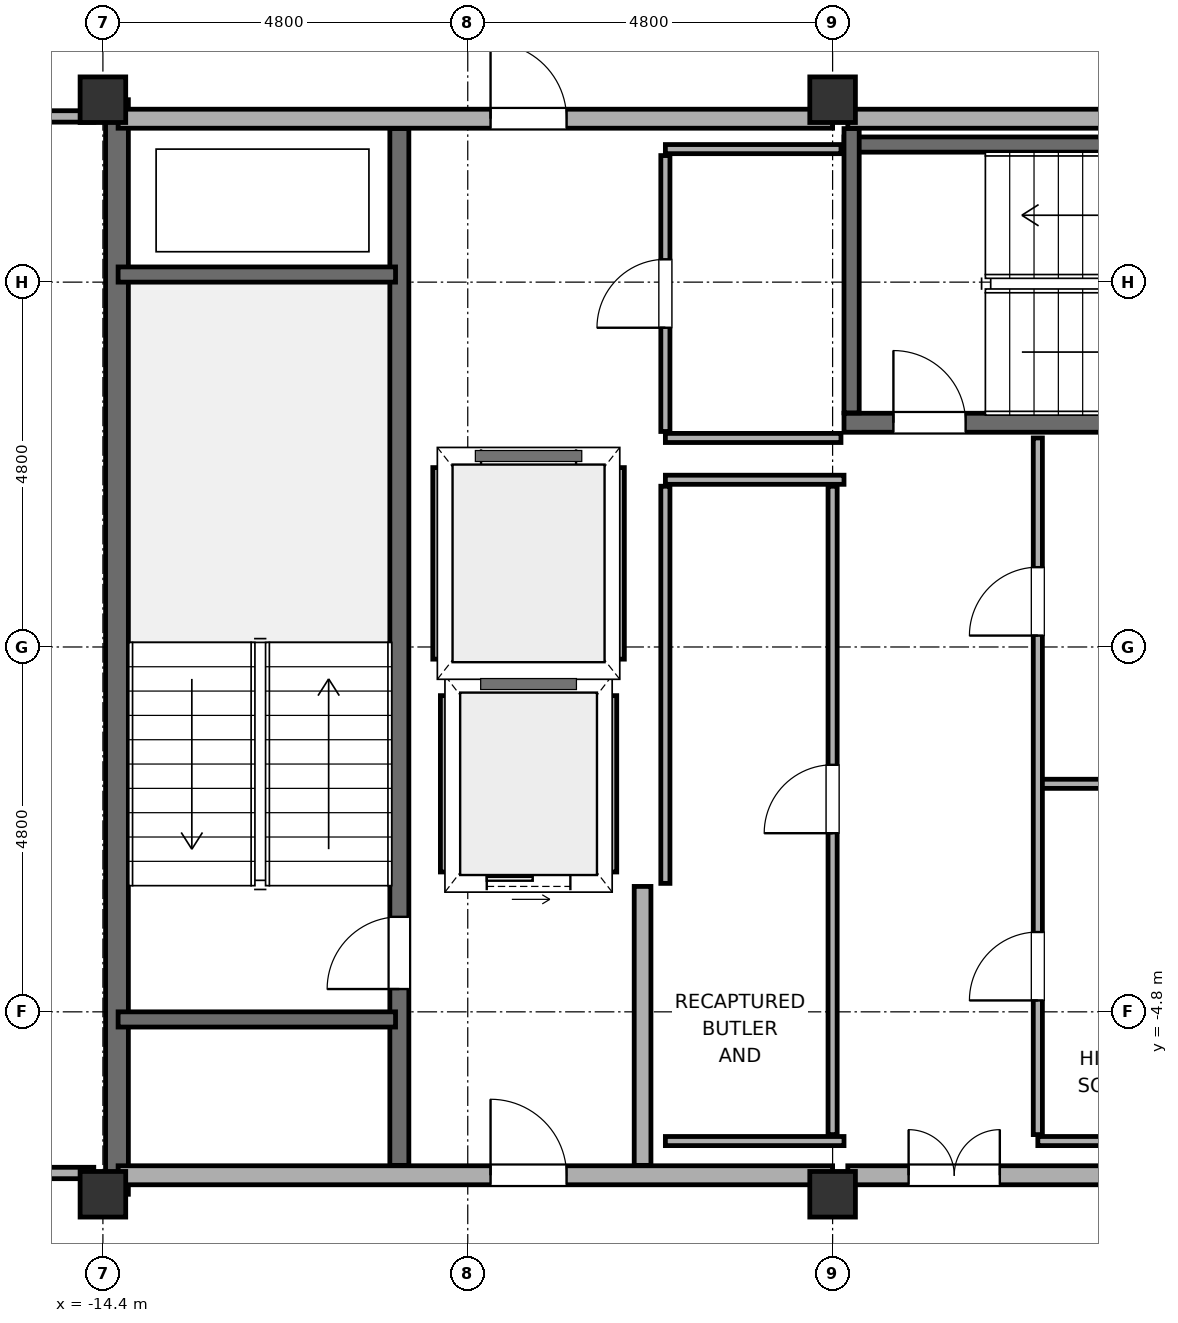
"""IFC4 building model, lengths in metres.
Left out: names, types, materials, properties, quantities, classifications, styles, units other than length and angle.
Written with IfcOpenShell. Run it as: python <this file> out.ifc"""

import sys

from ifc_helpers import new_model, si_unit, direction, frame, frame_2d, origin, origin_2d, place, context, subcontext, project, spatial, rectangle, hollow_rectangle, extrude, element, fill, save


model = new_model("IFC4")
c1 = context("Model", 3, precision=1e-05, world=origin(), true_north=direction((0.0, 1.0)))
c2 = subcontext(c1, "Body", "Model", "MODEL_VIEW")
j1 = project(units=[si_unit("LENGTHUNIT", "METRE"), si_unit("PLANEANGLEUNIT", "RADIAN")], contexts=[c1])
p1 = place(None, origin())
s1 = spatial("IfcSite", under=j1, at=p1, CompositionType="ELEMENT")
p2 = place(p1, origin())
s2 = spatial("IfcBuilding", under=s1, at=p2, CompositionType="ELEMENT")
p3 = place(p2, frame((0.0, 0.0, 222.3)))
s3 = spatial("IfcBuildingStorey", under=s2, at=p3, CompositionType="ELEMENT", Elevation=222.3)
for number, where, z_axis, x_axis in (
    (1, (-14.4, -7.2, 0.0), (0.0, 0.0, 1.0), (1.0, 0.0, 0.0)),
    (2, (-14.4, 7.2, 0.0), (0.0, 0.0, 1.0), (1.0, 0.0, 0.0)),
    (3, (-4.8, -7.2, 0.0), (0.0, 0.0, 1.0), (1.0, 0.0, 0.0)),
    (4, (-4.8, 7.2, 0.0), (0.0, 0.0, 1.0), (1.0, 0.0, 0.0)),
):
    element("IfcColumn", number, at=place(p3, frame(where, z_axis=z_axis, x_axis=x_axis)), inside=s3, PredefinedType="COLUMN", context=c2, shape_type="SweptSolid", body=[
        extrude(hollow_rectangle(XDim=0.6, YDim=0.6, WallThickness=0.028, at=origin_2d()), origin(), (0.0, 0.0, 1.0), 3.85),
    ])
p4 = place(p3, frame((-14.215, -7.2, -0.18), z_axis=(0.0, 0.0, 1.0), x_axis=(0.0, 1.0, 0.0)))
e5 = element("IfcWall", 5, at=p4, inside=s3, PredefinedType="SHEAR", context=c2, shape_type="SweptSolid", body=[
    extrude(rectangle(XDim=14.4, YDim=0.3, at=frame_2d((7.2, 0.0))), origin(), (0.0, 0.0, 1.0), 3.85),
])
p5 = place(p3, frame((-14.2, -6.95, 0.0), z_axis=(0.0, 0.0, 1.0), x_axis=(1.0, 0.0, 0.0)))
e6 = element("IfcWall", 6, at=p5, inside=s3, PredefinedType="SOLIDWALL", context=c2, shape_type="SweptSolid", body=[
    extrude(rectangle(XDim=9.4, YDim=0.25, at=frame_2d((4.7, 0.0))), origin(), (0.0, 0.0, 1.0), 2.27),
])
p6 = place(p5, frame((4.9, 0.0, 0.0)))
e7 = element("IfcOpeningElement", 7, at=p6, cuts=e6, PredefinedType="OPENING", context=c2, shape_type="SweptSolid", body=[
    extrude(rectangle(XDim=1.0, YDim=2.15, at=frame_2d((0.5, 1.075))), frame((0.0, 0.14, 0.0), z_axis=(0.0, -1.0, 0.0), x_axis=(1.0, 0.0, 0.0)), (0.0, 0.0, 1.0), 0.28),
])
p7 = place(p3, frame((-4.6, -6.95, 0.0), z_axis=(0.0, 0.0, 1.0), x_axis=(1.0, 0.0, 0.0)))
e8 = element("IfcWall", 8, at=p7, inside=s3, PredefinedType="SOLIDWALL", context=c2, shape_type="SweptSolid", body=[
    extrude(rectangle(XDim=9.2, YDim=0.25, at=frame_2d((4.6, 0.0))), origin(), (0.0, 0.0, 1.0), 2.47),
])
p8 = place(p7, frame((0.8, 0.0, 0.0)))
e9 = element("IfcOpeningElement", 9, at=p8, cuts=e8, PredefinedType="OPENING", context=c2, shape_type="SweptSolid", body=[
    extrude(rectangle(XDim=1.2, YDim=2.2, at=frame_2d((0.6, 1.1))), frame((0.0, 0.14, 0.0), z_axis=(0.0, -1.0, 0.0), x_axis=(1.0, 0.0, 0.0)), (0.0, 0.0, 1.0), 0.28),
])
p9 = place(p7, frame((5.55, 0.0, 0.0)))
e10 = element("IfcOpeningElement", 10, at=p9, cuts=e8, PredefinedType="OPENING", context=c2, shape_type="SweptSolid", body=[
    extrude(rectangle(XDim=1.2, YDim=2.2, at=frame_2d((0.6, 1.1))), frame((0.0, 0.14, 0.0), z_axis=(0.0, -1.0, 0.0), x_axis=(1.0, 0.0, 0.0)), (0.0, 0.0, 1.0), 0.28),
])
p10 = place(p3, frame((-14.2, 6.95, 0.0), z_axis=(0.0, 0.0, 1.0), x_axis=(1.0, 0.0, 0.0)))
e11 = element("IfcWall", 11, at=p10, inside=s3, PredefinedType="SOLIDWALL", context=c2, shape_type="SweptSolid", body=[
    extrude(rectangle(XDim=9.4, YDim=0.25, at=frame_2d((4.7, 0.0))), origin(), (0.0, 0.0, 1.0), 2.27),
])
p11 = place(p10, frame((4.9, 0.0, 0.0)))
e12 = element("IfcOpeningElement", 12, at=p11, cuts=e11, PredefinedType="OPENING", context=c2, shape_type="SweptSolid", body=[
    extrude(rectangle(XDim=1.0, YDim=2.15, at=frame_2d((0.5, 1.075))), frame((0.0, 0.14, 0.0), z_axis=(0.0, -1.0, 0.0), x_axis=(1.0, 0.0, 0.0)), (0.0, 0.0, 1.0), 0.28),
])
p12 = place(p3, frame((-4.6, 6.95, 0.0), z_axis=(0.0, 0.0, 1.0), x_axis=(1.0, 0.0, 0.0)))
e13 = element("IfcWall", 13, at=p12, inside=s3, PredefinedType="SOLIDWALL", context=c2, shape_type="SweptSolid", body=[
    extrude(rectangle(XDim=9.2, YDim=0.25, at=frame_2d((4.6, 0.0))), origin(), (0.0, 0.0, 1.0), 2.27),
])
p13 = place(p3, frame((-7.3, -6.82, 0.0), z_axis=(0.0, 0.0, 1.0), x_axis=(0.0, 1.0, 0.0)))
e14 = element("IfcWall", 14, at=p13, inside=s3, PredefinedType="SOLIDWALL", context=c2, shape_type="SweptSolid", body=[
    extrude(rectangle(XDim=3.67, YDim=0.22, at=frame_2d((1.835, 0.0))), origin(), (0.0, 0.0, 1.0), 2.27),
])
p14 = place(p3, frame((-10.5, -6.82, -0.18), z_axis=(0.0, 0.0, 1.0), x_axis=(0.0, 1.0, 0.0)))
e15 = element("IfcWall", 15, at=p14, inside=s3, PredefinedType="SOLIDWALL", context=c2, shape_type="SweptSolid", body=[
    extrude(rectangle(XDim=13.64, YDim=0.25, at=frame_2d((6.82, 0.0))), origin(), (0.0, 0.0, 1.0), 3.85),
])
p15 = place(p14, frame((2.32, 0.0, 0.18)))
e16 = element("IfcOpeningElement", 16, at=p15, cuts=e15, PredefinedType="OPENING", context=c2, shape_type="SweptSolid", body=[
    extrude(rectangle(XDim=0.95, YDim=2.15, at=frame_2d((0.475, 1.075))), frame((0.0, 0.14, 0.0), z_axis=(0.0, -1.0, 0.0), x_axis=(1.0, 0.0, 0.0)), (0.0, 0.0, 1.0), 0.28),
])
for number, where, z_axis, x_axis in (
    (17, (-14.2, -4.9, -0.18), (0.0, 0.0, 1.0), (1.0, 0.0, 0.0)),
    (18, (-14.2, 4.9, -0.18), (0.0, 0.0, 1.0), (1.0, 0.0, 0.0)),
):
    element("IfcWall", number, at=place(p3, frame(where, z_axis=z_axis, x_axis=x_axis)), inside=s3, PredefinedType="SOLIDWALL", context=c2, shape_type="SweptSolid", body=[
        extrude(rectangle(XDim=3.65, YDim=0.2, at=frame_2d((1.825, 0.0))), origin(), (0.0, 0.0, 1.0), 3.85),
    ])
p16 = place(p3, frame((-4.65, 2.95, -0.18), z_axis=(0.0, 0.0, 1.0), x_axis=(1.0, 0.0, 0.0)))
e19 = element("IfcWall", 19, at=p16, inside=s3, PredefinedType="SOLIDWALL", context=c2, shape_type="SweptSolid", body=[
    extrude(rectangle(XDim=9.9, YDim=0.25, at=frame_2d((4.95, 0.0))), origin(), (0.0, 0.0, 1.0), 3.85),
])
p17 = place(p16, frame((0.65, 0.0, 0.18)))
e20 = element("IfcOpeningElement", 20, at=p17, cuts=e19, PredefinedType="OPENING", context=c2, shape_type="SweptSolid", body=[
    extrude(rectangle(XDim=0.95, YDim=2.15, at=frame_2d((0.475, 1.075))), frame((0.0, 0.14, 0.0), z_axis=(0.0, -1.0, 0.0), x_axis=(1.0, 0.0, 0.0)), (0.0, 0.0, 1.0), 0.28),
])
p18 = place(p3, frame((-4.65, 6.61, -0.18), z_axis=(0.0, 0.0, 1.0), x_axis=(1.0, 0.0, 0.0)))
e21 = element("IfcWall", 21, at=p18, inside=s3, PredefinedType="SOLIDWALL", context=c2, shape_type="SweptSolid", body=[
    extrude(rectangle(XDim=9.9, YDim=0.2, at=frame_2d((4.95, 0.0))), origin(), (0.0, 0.0, 1.0), 3.85),
])
p19 = place(p3, frame((-4.55, 3.08, -0.18), z_axis=(0.0, 0.0, 1.0), x_axis=(0.0, 1.0, 0.0)))
e22 = element("IfcWall", 22, at=p19, inside=s3, PredefinedType="SOLIDWALL", context=c2, shape_type="SweptSolid", body=[
    extrude(rectangle(XDim=3.74, YDim=0.2, at=frame_2d((1.87, 0.0))), origin(), (0.0, 0.0, 1.0), 3.85),
])
p20 = place(p3, frame((-9.82, -3.1, 0.0), z_axis=(0.0, 0.0, 1.0), x_axis=(1.0, 0.0, 0.0)))
e23 = element("IfcWall", 23, at=p20, inside=s3, PredefinedType="SOLIDWALL", context=c2, shape_type="SweptSolid", body=[
    extrude(rectangle(XDim=2.04, YDim=0.2, at=frame_2d((1.02, 0.0))), origin(), (0.0, 0.0, 1.0), 3.67),
])
p21 = place(p20, frame((0.47, 0.0, 0.0)))
e24 = element("IfcOpeningElement", 24, at=p21, cuts=e23, PredefinedType="OPENING", context=c2, shape_type="SweptSolid", body=[
    extrude(rectangle(XDim=1.1, YDim=2.2, at=frame_2d((0.55, 1.1))), frame((0.0, 0.115, 0.0), z_axis=(0.0, -1.0, 0.0), x_axis=(1.0, 0.0, 0.0)), (0.0, 0.0, 1.0), 0.23),
])
p22 = place(p3, frame((-9.82, -0.5, 0.0), z_axis=(0.0, 0.0, 1.0), x_axis=(1.0, 0.0, 0.0)))
e25 = element("IfcWall", 25, at=p22, inside=s3, PredefinedType="SOLIDWALL", context=c2, shape_type="SweptSolid", body=[
    extrude(rectangle(XDim=2.04, YDim=0.2, at=frame_2d((1.02, 0.0))), origin(), (0.0, 0.0, 1.0), 3.67),
])
for number, where, z_axis, x_axis in (
    (26, (-9.9, -2.96, 0.0), (0.0, 0.0, 1.0), (0.0, 1.0, 0.0)),
    (27, (-7.7, -2.96, 0.0), (0.0, 0.0, 1.0), (0.0, 1.0, 0.0)),
):
    element("IfcWall", number, at=place(p3, frame(where, z_axis=z_axis, x_axis=x_axis)), inside=s3, PredefinedType="PARTITIONING", context=c2, shape_type="SweptSolid", body=[
        extrude(rectangle(XDim=2.32, YDim=0.12, at=frame_2d((1.16, 0.0))), origin(), (0.0, 0.0, 1.0), 3.67),
    ])
p23 = place(p3, frame((-9.92, 2.5, 0.0), z_axis=(0.0, 0.0, 1.0), x_axis=(1.0, 0.0, 0.0)))
e28 = element("IfcWall", 28, at=p23, inside=s3, PredefinedType="SOLIDWALL", context=c2, shape_type="SweptSolid", body=[
    extrude(rectangle(XDim=2.24, YDim=0.2, at=frame_2d((1.12, 0.0))), origin(), (0.0, 0.0, 1.0), 3.67),
])
p24 = place(p23, frame((0.495, 0.0, 0.0)))
e29 = element("IfcOpeningElement", 29, at=p24, cuts=e28, PredefinedType="OPENING", context=c2, shape_type="SweptSolid", body=[
    extrude(rectangle(XDim=1.25, YDim=2.25, at=frame_2d((0.625, 1.125))), frame((0.0, 0.115, 0.0), z_axis=(0.0, -1.0, 0.0), x_axis=(1.0, 0.0, 0.0)), (0.0, 0.0, 1.0), 0.23),
])
p25 = place(p3, frame((-9.92, -0.3, 0.0), z_axis=(0.0, 0.0, 1.0), x_axis=(1.0, 0.0, 0.0)))
e30 = element("IfcWall", 30, at=p25, inside=s3, PredefinedType="SOLIDWALL", context=c2, shape_type="SweptSolid", body=[
    extrude(rectangle(XDim=2.24, YDim=0.2, at=frame_2d((1.12, 0.0))), origin(), (0.0, 0.0, 1.0), 3.67),
])
for number, where, z_axis, x_axis in (
    (31, (-10.0, -0.16, 0.0), (0.0, 0.0, 1.0), (0.0, 1.0, 0.0)),
    (32, (-7.6, -0.16, 0.0), (0.0, 0.0, 1.0), (0.0, 1.0, 0.0)),
):
    element("IfcWall", number, at=place(p3, frame(where, z_axis=z_axis, x_axis=x_axis)), inside=s3, PredefinedType="PARTITIONING", context=c2, shape_type="SweptSolid", body=[
        extrude(rectangle(XDim=2.52, YDim=0.12, at=frame_2d((1.26, 0.0))), origin(), (0.0, 0.0, 1.0), 3.67),
    ])
p26 = place(p3, frame((-23.92, -6.92, 0.0), z_axis=(0.0, 0.0, 1.0), x_axis=(1.0, 0.0, 0.0)))
e33 = element("IfcWall", 33, at=p26, inside=s3, PredefinedType="PARTITIONING", context=c2, shape_type="SweptSolid", body=[
    extrude(rectangle(XDim=9.4, YDim=0.15, at=frame_2d((4.7, 0.0))), origin(), (0.0, 0.0, 1.0), 2.27),
])
p27 = place(p3, frame((-7.0, -6.5, 0.0), z_axis=(0.0, 0.0, 1.0), x_axis=(1.0, 0.0, 0.0)))
e34 = element("IfcWall", 34, at=p27, inside=s3, PredefinedType="PARTITIONING", context=c2, shape_type="SweptSolid", body=[
    extrude(rectangle(XDim=2.35, YDim=0.12, at=frame_2d((1.175, 0.0))), origin(), (0.0, 0.0, 1.0), 3.67),
])
for number, where, z_axis, x_axis in (
    (35, (-2.1, -6.5, 0.0), (0.0, 0.0, 1.0), (1.0, 0.0, 0.0)),
    (36, (-2.1, -1.8, 0.0), (0.0, 0.0, 1.0), (1.0, 0.0, 0.0)),
):
    element("IfcWall", number, at=place(p3, frame(where, z_axis=z_axis, x_axis=x_axis)), inside=s3, PredefinedType="PARTITIONING", context=c2, shape_type="SweptSolid", body=[
        extrude(rectangle(XDim=2.5, YDim=0.12, at=frame_2d((1.25, 0.0))), origin(), (0.0, 0.0, 1.0), 3.67),
    ])
p28 = place(p3, frame((-7.0, 2.2, 0.0), z_axis=(0.0, 0.0, 1.0), x_axis=(1.0, 0.0, 0.0)))
e37 = element("IfcWall", 37, at=p28, inside=s3, PredefinedType="PARTITIONING", context=c2, shape_type="SweptSolid", body=[
    extrude(rectangle(XDim=2.35, YDim=0.12, at=frame_2d((1.175, 0.0))), origin(), (0.0, 0.0, 1.0), 3.67),
])
for number, where, z_axis, x_axis in (
    (38, (-7.0, 2.75, 0.0), (0.0, 0.0, 1.0), (1.0, 0.0, 0.0)),
    (39, (-7.0, 6.55, 0.0), (0.0, 0.0, 1.0), (1.0, 0.0, 0.0)),
):
    element("IfcWall", number, at=place(p3, frame(where, z_axis=z_axis, x_axis=x_axis)), inside=s3, PredefinedType="PARTITIONING", context=c2, shape_type="SweptSolid", body=[
        extrude(rectangle(XDim=2.31, YDim=0.12, at=frame_2d((1.155, 0.0))), origin(), (0.0, 0.0, 1.0), 3.67),
    ])
p29 = place(p3, frame((-23.92, 6.98, 0.0), z_axis=(0.0, 0.0, 1.0), x_axis=(1.0, 0.0, 0.0)))
e40 = element("IfcWall", 40, at=p29, inside=s3, PredefinedType="PARTITIONING", context=c2, shape_type="SweptSolid", body=[
    extrude(rectangle(XDim=9.4, YDim=0.15, at=frame_2d((4.7, 0.0))), origin(), (0.0, 0.0, 1.0), 2.27),
])
p30 = place(p3, frame((-7.0, -3.11, 0.0), z_axis=(0.0, 0.0, 1.0), x_axis=(0.0, 1.0, 0.0)))
e41 = element("IfcWall", 41, at=p30, inside=s3, PredefinedType="PARTITIONING", context=c2, shape_type="SweptSolid", body=[
    extrude(rectangle(XDim=5.225, YDim=0.12, at=frame_2d((2.613, 0.0))), origin(), (0.0, 0.0, 1.0), 3.67),
])
p31 = place(p3, frame((-7.0, 2.835, 0.0), z_axis=(0.0, 0.0, 1.0), x_axis=(0.0, 1.0, 0.0)))
e42 = element("IfcWall", 42, at=p31, inside=s3, PredefinedType="PARTITIONING", context=c2, shape_type="SweptSolid", body=[
    extrude(rectangle(XDim=3.63, YDim=0.12, at=frame_2d((1.815, 0.0))), origin(), (0.0, 0.0, 1.0), 3.67),
])
p32 = place(p31, frame((1.365, 0.0, 0.0)))
e43 = element("IfcOpeningElement", 43, at=p32, cuts=e42, PredefinedType="OPENING", context=c2, shape_type="SweptSolid", body=[
    extrude(rectangle(XDim=0.9, YDim=2.1, at=frame_2d((0.45, 1.05))), frame((0.0, 0.075, 0.0), z_axis=(0.0, -1.0, 0.0), x_axis=(1.0, 0.0, 0.0)), (0.0, 0.0, 1.0), 0.15),
])
p33 = place(p3, frame((-4.8, -6.415, 0.0), z_axis=(0.0, 0.0, 1.0), x_axis=(0.0, 1.0, 0.0)))
e44 = element("IfcWall", 44, at=p33, inside=s3, PredefinedType="PARTITIONING", context=c2, shape_type="SweptSolid", body=[
    extrude(rectangle(XDim=8.53, YDim=0.12, at=frame_2d((4.265, 0.0))), origin(), (0.0, 0.0, 1.0), 3.67),
])
p34 = place(p33, frame((3.965, 0.0, 0.0)))
e45 = element("IfcOpeningElement", 45, at=p34, cuts=e44, PredefinedType="OPENING", context=c2, shape_type="SweptSolid", body=[
    extrude(rectangle(XDim=0.9, YDim=2.1, at=frame_2d((0.45, 1.05))), frame((0.0, 0.075, 0.0), z_axis=(0.0, -1.0, 0.0), x_axis=(1.0, 0.0, 0.0)), (0.0, 0.0, 1.0), 0.15),
])
p35 = place(p3, frame((-2.1, -6.415, 0.0), z_axis=(0.0, 0.0, 1.0), x_axis=(0.0, 1.0, 0.0)))
e46 = element("IfcWall", 46, at=p35, inside=s3, PredefinedType="PARTITIONING", context=c2, shape_type="SweptSolid", body=[
    extrude(rectangle(XDim=9.165, YDim=0.12, at=frame_2d((4.583, 0.0))), origin(), (0.0, 0.0, 1.0), 3.67),
])
p36 = place(p35, frame((1.765, 0.0, 0.0)))
e47 = element("IfcOpeningElement", 47, at=p36, cuts=e46, PredefinedType="OPENING", context=c2, shape_type="SweptSolid", body=[
    extrude(rectangle(XDim=0.9, YDim=2.1, at=frame_2d((0.45, 1.05))), frame((0.0, 0.075, 0.0), z_axis=(0.0, -1.0, 0.0), x_axis=(1.0, 0.0, 0.0)), (0.0, 0.0, 1.0), 0.15),
])
p37 = place(p35, frame((6.565, 0.0, 0.0)))
e48 = element("IfcOpeningElement", 48, at=p37, cuts=e46, PredefinedType="OPENING", context=c2, shape_type="SweptSolid", body=[
    extrude(rectangle(XDim=0.9, YDim=2.1, at=frame_2d((0.45, 1.05))), frame((0.0, 0.075, 0.0), z_axis=(0.0, -1.0, 0.0), x_axis=(1.0, 0.0, 0.0)), (0.0, 0.0, 1.0), 0.15),
])
p38 = place(p6, origin())
e49 = element("IfcDoor", 49, at=p38, inside=s3, OperationType="SINGLE_SWING_RIGHT", PredefinedType="DOOR", context=c2, shape_type="SweptSolid", body=[
    extrude(rectangle(XDim=1.0, YDim=2.15, at=frame_2d((0.5, 1.075))), frame((0.0, 0.025, 0.0), z_axis=(0.0, -1.0, 0.0), x_axis=(1.0, 0.0, 0.0)), (0.0, 0.0, 1.0), 0.05),
])
fill(e7, e49)
p39 = place(p8, origin())
e50 = element("IfcDoor", 50, at=p39, inside=s3, OperationType="DOUBLE_DOOR_SINGLE_SWING", PredefinedType="DOOR", context=c2, shape_type="SweptSolid", body=[
    extrude(rectangle(XDim=1.2, YDim=2.2, at=frame_2d((0.6, 1.1))), frame((0.0, 0.025, 0.0), z_axis=(0.0, -1.0, 0.0), x_axis=(1.0, 0.0, 0.0)), (0.0, 0.0, 1.0), 0.05),
])
fill(e9, e50)
p40 = place(p11, origin())
e51 = element("IfcDoor", 51, at=p40, inside=s3, OperationType="SINGLE_SWING_LEFT", PredefinedType="DOOR", context=c2, shape_type="SweptSolid", body=[
    extrude(rectangle(XDim=1.0, YDim=2.15, at=frame_2d((0.5, 1.075))), frame((0.0, 0.025, 0.0), z_axis=(0.0, -1.0, 0.0), x_axis=(1.0, 0.0, 0.0)), (0.0, 0.0, 1.0), 0.05),
])
fill(e12, e51)
p41 = place(p15, origin())
e52 = element("IfcDoor", 52, at=p41, inside=s3, OperationType="SINGLE_SWING_RIGHT", PredefinedType="DOOR", context=c2, shape_type="SweptSolid", body=[
    extrude(rectangle(XDim=0.95, YDim=2.15, at=frame_2d((0.475, 1.075))), frame((0.0, 0.025, 0.0), z_axis=(0.0, -1.0, 0.0), x_axis=(1.0, 0.0, 0.0)), (0.0, 0.0, 1.0), 0.05),
])
fill(e16, e52)
p42 = place(p17, origin())
e53 = element("IfcDoor", 53, at=p42, inside=s3, OperationType="SINGLE_SWING_LEFT", PredefinedType="DOOR", context=c2, shape_type="SweptSolid", body=[
    extrude(rectangle(XDim=0.95, YDim=2.15, at=frame_2d((0.475, 1.075))), frame((0.0, 0.025, 0.0), z_axis=(0.0, -1.0, 0.0), x_axis=(1.0, 0.0, 0.0)), (0.0, 0.0, 1.0), 0.05),
])
fill(e20, e53)
p43 = place(p21, origin())
e54 = element("IfcDoor", 54, at=p43, inside=s3, OperationType="SLIDING_TO_LEFT", PredefinedType="DOOR", context=c2, shape_type="SweptSolid", body=[
    extrude(rectangle(XDim=1.1, YDim=2.2, at=frame_2d((0.55, 1.1))), frame((0.0, 0.025, 0.0), z_axis=(0.0, -1.0, 0.0), x_axis=(1.0, 0.0, 0.0)), (0.0, 0.0, 1.0), 0.05),
])
fill(e24, e54)
p44 = place(p24, origin())
e55 = element("IfcDoor", 55, at=p44, inside=s3, OperationType="SLIDING_TO_LEFT", PredefinedType="DOOR", context=c2, shape_type="SweptSolid", body=[
    extrude(rectangle(XDim=1.25, YDim=2.25, at=frame_2d((0.625, 1.125))), frame((0.0, 0.025, 0.0), z_axis=(0.0, -1.0, 0.0), x_axis=(1.0, 0.0, 0.0)), (0.0, 0.0, 1.0), 0.05),
])
fill(e29, e55)
p45 = place(p34, origin())
e56 = element("IfcDoor", 56, at=p45, inside=s3, OperationType="SINGLE_SWING_LEFT", PredefinedType="DOOR", context=c2, shape_type="SweptSolid", body=[
    extrude(rectangle(XDim=0.9, YDim=2.1, at=frame_2d((0.45, 1.05))), frame((0.0, 0.025, 0.0), z_axis=(0.0, -1.0, 0.0), x_axis=(1.0, 0.0, 0.0)), (0.0, 0.0, 1.0), 0.05),
])
fill(e45, e56)
p46 = place(p32, origin())
e57 = element("IfcDoor", 57, at=p46, inside=s3, OperationType="SINGLE_SWING_RIGHT", PredefinedType="DOOR", context=c2, shape_type="SweptSolid", body=[
    extrude(rectangle(XDim=0.9, YDim=2.1, at=frame_2d((0.45, 1.05))), frame((0.0, 0.025, 0.0), z_axis=(0.0, -1.0, 0.0), x_axis=(1.0, 0.0, 0.0)), (0.0, 0.0, 1.0), 0.05),
])
fill(e43, e57)
p47 = place(p36, origin())
e58 = element("IfcDoor", 58, at=p47, inside=s3, OperationType="SINGLE_SWING_RIGHT", PredefinedType="DOOR", context=c2, shape_type="SweptSolid", body=[
    extrude(rectangle(XDim=0.9, YDim=2.1, at=frame_2d((0.45, 1.05))), frame((0.0, 0.025, 0.0), z_axis=(0.0, -1.0, 0.0), x_axis=(1.0, 0.0, 0.0)), (0.0, 0.0, 1.0), 0.05),
])
fill(e47, e58)
p48 = place(p37, origin())
e59 = element("IfcDoor", 59, at=p48, inside=s3, OperationType="SINGLE_SWING_RIGHT", PredefinedType="DOOR", context=c2, shape_type="SweptSolid", body=[
    extrude(rectangle(XDim=0.9, YDim=2.1, at=frame_2d((0.45, 1.05))), frame((0.0, 0.025, 0.0), z_axis=(0.0, -1.0, 0.0), x_axis=(1.0, 0.0, 0.0)), (0.0, 0.0, 1.0), 0.05),
])
fill(e48, e59)
save(model, sys.argv[1])
